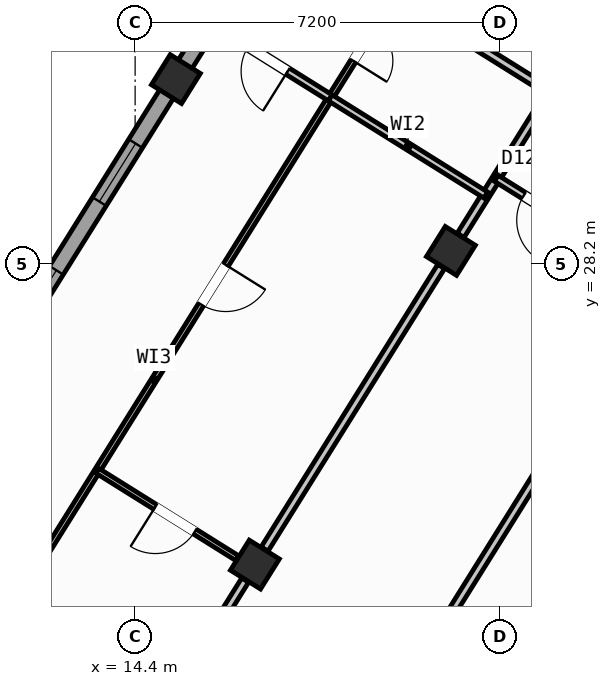
"""IFC4 building model, lengths in metres.
Left out: names, types, materials, properties, quantities, classifications, styles, units other than length and angle.
Written with IfcOpenShell. Run it as: python <this file> out.ifc"""

import sys

from ifc_helpers import new_model, si_unit, direction, frame, frame_2d, origin, origin_2d, place, context, subcontext, project, spatial, rectangle, hollow_rectangle, extrude, source, transform, mapped, element, fill, save


model = new_model("IFC4")
c1 = context("Model", 3, precision=1e-05, world=origin(), true_north=direction((0.0, 1.0)))
c2 = subcontext(c1, "Body", "Model", "MODEL_VIEW")
j1 = project(units=[si_unit("LENGTHUNIT", "METRE"), si_unit("PLANEANGLEUNIT", "RADIAN")], contexts=[c1])
p1 = place(None, origin())
s1 = spatial("IfcSite", under=j1, at=p1, CompositionType="ELEMENT")
p2 = place(p1, origin())
s2 = spatial("IfcBuilding", under=s1, at=p2, CompositionType="ELEMENT")
p3 = place(p2, frame((0.0, 0.0, 284.4)))
s3 = spatial("IfcBuildingStorey", under=s2, at=p3, CompositionType="ELEMENT", Elevation=284.4)
m1 = source(origin(), c2, "Body", "SweptSolid", [
    extrude(hollow_rectangle(XDim=0.7, YDim=0.7, WallThickness=0.028, at=origin_2d()), origin(), (0.0, 0.0, 1.0), 3.6),
])
for number, where, z_axis, x_axis in (
    (1, (20.632, 28.452, 0.0), (0.0, 0.0, 1.0), (-0.848, 0.53, 0.0)),
    (2, (16.764, 22.261, 0.0), (0.0, 0.0, 1.0), (-0.848, 0.53, 0.0)),
    (3, (15.205, 31.844, 0.0), (0.0, 0.0, 1.0), (-0.848, 0.53, 0.0)),
):
    element("IfcColumn", number, at=place(p3, frame(where, z_axis=z_axis, x_axis=x_axis)), inside=s3, PredefinedType="COLUMN", context=c2, shape_type="MappedRepresentation", body=[
        mapped(m1, transform((0.0, 0.0, 0.0), scale=1.0)),
    ])
p4 = place(p3, frame((7.842, 20.061, 0.0), z_axis=(0.0, 0.0, 1.0), x_axis=(0.529915577903, 0.84805039962, 0.0)))
e4 = element("IfcWall", 4, at=p4, inside=s3, PredefinedType="STANDARD", context=c2, shape_type="SweptSolid", body=[
    extrude(rectangle(XDim=21.587, YDim=0.32, at=frame_2d((10.794, 0.0))), origin(), (0.0, 0.0, 1.0), 2.875),
])
p5 = place(p4, frame((2.606, 0.0, 0.9)))
e5 = element("IfcOpeningElement", 5, at=p5, cuts=e4, PredefinedType="OPENING", context=c2, shape_type="SweptSolid", body=[
    extrude(rectangle(XDim=1.65, YDim=1.45, at=frame_2d((0.825, 0.725))), frame((0.0, 0.17, 0.0), z_axis=(0.0, -1.0, 0.0), x_axis=(1.0, 0.0, 0.0)), (0.0, 0.0, 1.0), 0.34),
])
p6 = place(p4, frame((8.094, 0.0, 0.9)))
e6 = element("IfcOpeningElement", 6, at=p6, cuts=e4, PredefinedType="OPENING", context=c2, shape_type="SweptSolid", body=[
    extrude(rectangle(XDim=1.35, YDim=1.45, at=frame_2d((0.675, 0.725))), frame((0.0, 0.17, 0.0), z_axis=(0.0, -1.0, 0.0), x_axis=(1.0, 0.0, 0.0)), (0.0, 0.0, 1.0), 0.34),
])
p7 = place(p4, frame((11.044, 0.0, 0.9)))
e7 = element("IfcOpeningElement", 7, at=p7, cuts=e4, PredefinedType="OPENING", context=c2, shape_type="SweptSolid", body=[
    extrude(rectangle(XDim=1.35, YDim=1.45, at=frame_2d((0.675, 0.725))), frame((0.0, 0.17, 0.0), z_axis=(0.0, -1.0, 0.0), x_axis=(1.0, 0.0, 0.0)), (0.0, 0.0, 1.0), 0.34),
])
p8 = place(p4, frame((15.939, 0.0, 1.0)))
e8 = element("IfcOpeningElement", 8, at=p8, cuts=e4, PredefinedType="OPENING", context=c2, shape_type="SweptSolid", body=[
    extrude(rectangle(XDim=0.9, YDim=1.25, at=frame_2d((0.45, 0.625))), frame((0.0, 0.17, 0.0), z_axis=(0.0, -1.0, 0.0), x_axis=(1.0, 0.0, 0.0)), (0.0, 0.0, 1.0), 0.34),
])
p9 = place(p3, frame((19.566, 38.434, 0.0), z_axis=(0.0, 0.0, 1.0), x_axis=(0.84804567626, -0.529923136858, 0.0)))
e9 = element("IfcWall", 9, at=p9, inside=s3, PredefinedType="STANDARD", context=c2, shape_type="SweptSolid", body=[
    extrude(rectangle(XDim=25.188, YDim=0.32, at=frame_2d((12.594, 0.0))), origin(), (0.0, 0.0, 1.0), 3.35),
])
p10 = place(p9, frame((3.355, 0.0, 0.0)))
e10 = element("IfcOpeningElement", 10, at=p10, cuts=e9, PredefinedType="OPENING", context=c2, shape_type="SweptSolid", body=[
    extrude(rectangle(XDim=1.05, YDim=2.15, at=frame_2d((0.525, 1.075))), frame((0.0, 0.17, 0.0), z_axis=(0.0, -1.0, 0.0), x_axis=(1.0, 0.0, 0.0)), (0.0, 0.0, 1.0), 0.34),
])
p11 = place(p9, frame((0.939, 0.0, 0.9)))
e11 = element("IfcOpeningElement", 11, at=p11, cuts=e9, PredefinedType="OPENING", context=c2, shape_type="SweptSolid", body=[
    extrude(rectangle(XDim=1.65, YDim=1.45, at=frame_2d((0.825, 0.725))), frame((0.0, 0.17, 0.0), z_axis=(0.0, -1.0, 0.0), x_axis=(1.0, 0.0, 0.0)), (0.0, 0.0, 1.0), 0.34),
])
p12 = place(p9, frame((7.499, 0.0, 0.9)))
e12 = element("IfcOpeningElement", 12, at=p12, cuts=e9, PredefinedType="OPENING", context=c2, shape_type="SweptSolid", body=[
    extrude(rectangle(XDim=1.35, YDim=1.45, at=frame_2d((0.675, 0.725))), frame((0.0, 0.17, 0.0), z_axis=(0.0, -1.0, 0.0), x_axis=(1.0, 0.0, 0.0)), (0.0, 0.0, 1.0), 0.34),
])
p13 = place(p9, frame((10.754, 0.0, 1.0)))
e13 = element("IfcOpeningElement", 13, at=p13, cuts=e9, PredefinedType="OPENING", context=c2, shape_type="SweptSolid", body=[
    extrude(rectangle(XDim=0.9, YDim=1.25, at=frame_2d((0.45, 0.625))), frame((0.0, 0.17, 0.0), z_axis=(0.0, -1.0, 0.0), x_axis=(1.0, 0.0, 0.0)), (0.0, 0.0, 1.0), 0.34),
])
p14 = place(p9, frame((15.694, 0.0, 1.0)))
e14 = element("IfcOpeningElement", 14, at=p14, cuts=e9, PredefinedType="OPENING", context=c2, shape_type="SweptSolid", body=[
    extrude(rectangle(XDim=0.9, YDim=1.25, at=frame_2d((0.45, 0.625))), frame((0.0, 0.17, 0.0), z_axis=(0.0, -1.0, 0.0), x_axis=(1.0, 0.0, 0.0)), (0.0, 0.0, 1.0), 0.34),
])
p15 = place(p9, frame((21.394, 0.0, 1.0)))
e15 = element("IfcOpeningElement", 15, at=p15, cuts=e9, PredefinedType="OPENING", context=c2, shape_type="SweptSolid", body=[
    extrude(rectangle(XDim=0.9, YDim=1.25, at=frame_2d((0.45, 0.625))), frame((0.0, 0.17, 0.0), z_axis=(0.0, -1.0, 0.0), x_axis=(1.0, 0.0, 0.0)), (0.0, 0.0, 1.0), 0.34),
])
p16 = place(p3, frame((25.807, 29.582, 0.0), z_axis=(0.0, 0.0, 1.0), x_axis=(-0.529918119251, -0.84804881162, 0.0)))
e16 = element("IfcWall", 16, at=p16, inside=s3, PredefinedType="PARTITIONING", context=c2, shape_type="SweptSolid", body=[
    extrude(rectangle(XDim=17.65, YDim=0.16, at=frame_2d((8.825, 0.0))), origin(), (0.0, 0.0, 1.0), 3.34),
])
p17 = place(p3, frame((26.973, 31.447, 0.0), z_axis=(0.0, 0.0, 1.0), x_axis=(-0.84805406617, 0.529909710094, 0.0)))
e17 = element("IfcWall", 17, at=p17, inside=s3, PredefinedType="PARTITIONING", context=c2, shape_type="SweptSolid", body=[
    extrude(rectangle(XDim=10.33, YDim=0.16, at=frame_2d((5.165, 0.0))), origin(), (0.0, 0.0, 1.0), 3.34),
])
p18 = place(p17, frame((1.459, 0.0, 0.0)))
e18 = element("IfcOpeningElement", 18, at=p18, cuts=e17, PredefinedType="OPENING", context=c2, shape_type="SweptSolid", body=[
    extrude(rectangle(XDim=1.0, YDim=2.1, at=frame_2d((0.5, 1.05))), frame((0.0, 0.09, 0.0), z_axis=(0.0, -1.0, 0.0), x_axis=(1.0, 0.0, 0.0)), (0.0, 0.0, 1.0), 0.18),
])
p19 = place(p17, frame((6.614, 0.0, 0.0)))
e19 = element("IfcOpeningElement", 19, at=p19, cuts=e17, PredefinedType="OPENING", context=c2, shape_type="SweptSolid", body=[
    extrude(rectangle(XDim=1.0, YDim=2.1, at=frame_2d((0.5, 1.05))), frame((0.0, 0.09, 0.0), z_axis=(0.0, -1.0, 0.0), x_axis=(1.0, 0.0, 0.0)), (0.0, 0.0, 1.0), 0.18),
])
p20 = place(p3, frame((25.807, 29.582, 0.0), z_axis=(0.0, 0.0, 1.0), x_axis=(-0.848060702647, 0.529899089097, 0.0)))
e20 = element("IfcWall", 20, at=p20, inside=s3, PredefinedType="PARTITIONING", context=c2, shape_type="SweptSolid", body=[
    extrude(rectangle(XDim=10.33, YDim=0.16, at=frame_2d((5.165, 0.0))), origin(), (0.0, 0.0, 1.0), 3.34),
])
p21 = place(p20, frame((2.22, 0.0, 0.0)))
e21 = element("IfcOpeningElement", 21, at=p21, cuts=e20, PredefinedType="OPENING", context=c2, shape_type="SweptSolid", body=[
    extrude(rectangle(XDim=0.86, YDim=2.05, at=frame_2d((0.43, 1.025))), frame((0.0, 0.09, 0.0), z_axis=(0.0, -1.0, 0.0), x_axis=(1.0, 0.0, 0.0)), (0.0, 0.0, 1.0), 0.18),
])
p22 = place(p20, frame((8.36, 0.0, 0.0)))
e22 = element("IfcOpeningElement", 22, at=p22, cuts=e20, PredefinedType="OPENING", context=c2, shape_type="SweptSolid", body=[
    extrude(rectangle(XDim=1.0, YDim=2.1, at=frame_2d((0.5, 1.05))), frame((0.0, 0.09, 0.0), z_axis=(0.0, -1.0, 0.0), x_axis=(1.0, 0.0, 0.0)), (0.0, 0.0, 1.0), 0.18),
])
p23 = place(p3, frame((22.593, 31.59, 0.0), z_axis=(0.0, 0.0, 1.0), x_axis=(-0.529900320499, -0.848059933221, 0.0)))
e23 = element("IfcWall", 23, at=p23, inside=s3, PredefinedType="PARTITIONING", context=c2, shape_type="SweptSolid", body=[
    extrude(rectangle(XDim=3.338, YDim=0.16, at=frame_2d((1.669, 0.0))), origin(), (0.0, 0.0, 1.0), 2.875),
])
p24 = place(p3, frame((20.44, 28.145, 0.0), z_axis=(0.0, 0.0, 1.0), x_axis=(-0.529938869374, -0.84803584519, 0.0)))
e24 = element("IfcWall", 24, at=p24, inside=s3, PredefinedType="PARTITIONING", context=c2, shape_type="SweptSolid", body=[
    extrude(rectangle(XDim=6.576, YDim=0.16, at=frame_2d((3.288, 0.0))), origin(), (0.0, 0.0, 1.0), 2.875),
])
p25 = place(p3, frame((16.572, 21.954, 0.0), z_axis=(0.0, 0.0, 1.0), x_axis=(-0.529904903214, -0.848057069748, 0.0)))
e25 = element("IfcWall", 25, at=p25, inside=s3, PredefinedType="PARTITIONING", context=c2, shape_type="SweptSolid", body=[
    extrude(rectangle(XDim=5.601, YDim=0.16, at=frame_2d((2.801, 0.0))), origin(), (0.0, 0.0, 1.0), 2.875),
])
p26 = place(p3, frame((24.742, 27.877, 0.0), z_axis=(0.0, 0.0, 1.0), x_axis=(-0.848059820872, 0.529900500304, 0.0)))
e26 = element("IfcWall", 26, at=p26, inside=s3, PredefinedType="PLUMBINGWALL", context=c2, shape_type="SweptSolid", body=[
    extrude(rectangle(XDim=3.79, YDim=0.14, at=frame_2d((1.895, 0.0))), origin(), (0.0, 0.0, 1.0), 3.34),
])
p27 = place(p26, frame((2.23, 0.0, 0.0)))
e27 = element("IfcOpeningElement", 27, at=p27, cuts=e26, PredefinedType="OPENING", context=c2, shape_type="SweptSolid", body=[
    extrude(rectangle(XDim=0.92, YDim=2.08, at=frame_2d((0.46, 1.04))), frame((0.0, 0.08, 0.0), z_axis=(0.0, -1.0, 0.0), x_axis=(1.0, 0.0, 0.0)), (0.0, 0.0, 1.0), 0.16),
])
p28 = place(p3, frame((19.523, 33.508, 0.0), z_axis=(0.0, 0.0, 1.0), x_axis=(-0.529910765222, -0.848053406869, 0.0)))
e28 = element("IfcWall", 28, at=p28, inside=s3, PredefinedType="PARTITIONING", context=c2, shape_type="SweptSolid", body=[
    extrude(rectangle(XDim=17.92, YDim=0.11, at=frame_2d((8.96, 0.0))), origin(), (0.0, 0.0, 1.0), 3.34),
])
p29 = place(p28, frame((0.76, 0.0, 0.0)))
e29 = element("IfcOpeningElement", 29, at=p29, cuts=e28, PredefinedType="OPENING", context=c2, shape_type="SweptSolid", body=[
    extrude(rectangle(XDim=0.78, YDim=2.05, at=frame_2d((0.39, 1.025))), frame((0.0, 0.065, 0.0), z_axis=(0.0, -1.0, 0.0), x_axis=(1.0, 0.0, 0.0)), (0.0, 0.0, 1.0), 0.13),
])
p30 = place(p28, frame((6.289, 0.0, 0.0)))
e30 = element("IfcOpeningElement", 30, at=p30, cuts=e28, PredefinedType="OPENING", context=c2, shape_type="SweptSolid", body=[
    extrude(rectangle(XDim=0.92, YDim=2.08, at=frame_2d((0.46, 1.04))), frame((0.0, 0.065, 0.0), z_axis=(0.0, -1.0, 0.0), x_axis=(1.0, 0.0, 0.0)), (0.0, 0.0, 1.0), 0.13),
])
p31 = place(p3, frame((18.251, 31.473, 0.0), z_axis=(0.0, 0.0, 1.0), x_axis=(-0.848059786386, 0.529900555496, 0.0)))
e31 = element("IfcWall", 31, at=p31, inside=s3, PredefinedType="PLUMBINGWALL", context=c2, shape_type="SweptSolid", body=[
    extrude(rectangle(XDim=2.9, YDim=0.14, at=frame_2d((1.45, 0.0))), origin(), (0.0, 0.0, 1.0), 3.34),
])
p32 = place(p31, frame((0.99, 0.0, 0.0)))
e32 = element("IfcOpeningElement", 32, at=p32, cuts=e31, PredefinedType="OPENING", context=c2, shape_type="SweptSolid", body=[
    extrude(rectangle(XDim=0.92, YDim=2.08, at=frame_2d((0.46, 1.04))), frame((0.0, 0.08, 0.0), z_axis=(0.0, -1.0, 0.0), x_axis=(1.0, 0.0, 0.0)), (0.0, 0.0, 1.0), 0.16),
])
p33 = place(p3, frame((21.321, 29.554, 0.0), z_axis=(0.0, 0.0, 1.0), x_axis=(-0.848021036626, 0.529962566074, 0.0)))
e33 = element("IfcWall", 33, at=p33, inside=s3, PredefinedType="PLUMBINGWALL", context=c2, shape_type="SweptSolid", body=[
    extrude(rectangle(XDim=3.62, YDim=0.14, at=frame_2d((1.81, 0.0))), origin(), (0.0, 0.0, 1.0), 3.34),
])
p34 = place(p3, frame((16.416, 22.388, 0.0), z_axis=(0.0, 0.0, 1.0), x_axis=(-0.84806986598, 0.529884423641, 0.0)))
e34 = element("IfcWall", 34, at=p34, inside=s3, PredefinedType="PARTITIONING", context=c2, shape_type="SweptSolid", body=[
    extrude(rectangle(XDim=3.258, YDim=0.11, at=frame_2d((1.629, 0.0))), origin(), (0.0, 0.0, 1.0), 2.875),
])
p35 = place(p34, frame((0.988, 0.0, 0.0)))
e35 = element("IfcOpeningElement", 35, at=p35, cuts=e34, PredefinedType="OPENING", context=c2, shape_type="SweptSolid", body=[
    extrude(rectangle(XDim=0.92, YDim=2.08, at=frame_2d((0.46, 1.04))), frame((0.0, 0.065, 0.0), z_axis=(0.0, -1.0, 0.0), x_axis=(1.0, 0.0, 0.0)), (0.0, 0.0, 1.0), 0.13),
])
m2 = source(origin(), c2, "Body", "SweptSolid", [
    extrude(rectangle(XDim=1.35, YDim=1.45, at=frame_2d((0.675, 0.725))), frame((0.0, 0.03, 0.0), z_axis=(0.0, -1.0, 0.0), x_axis=(1.0, 0.0, 0.0)), (0.0, 0.0, 1.0), 0.06),
])
p36 = place(p6, origin())
e36 = element("IfcWindow", 36, at=p36, inside=s3, PartitioningType="SINGLE_PANEL", PredefinedType="WINDOW", context=c2, shape_type="MappedRepresentation", body=[
    mapped(m2, transform((0.0, 0.0, 0.0), scale=1.0)),
])
fill(e6, e36)
p37 = place(p7, origin())
e37 = element("IfcWindow", 37, at=p37, inside=s3, PartitioningType="SINGLE_PANEL", PredefinedType="WINDOW", context=c2, shape_type="MappedRepresentation", body=[
    mapped(m2, transform((0.0, 0.0, 0.0), scale=1.0)),
])
fill(e7, e37)
m3 = source(origin(), c2, "Body", "SweptSolid", [
    extrude(rectangle(XDim=0.92, YDim=2.08, at=frame_2d((0.46, 1.04))), frame((0.0, 0.025, 0.0), z_axis=(0.0, -1.0, 0.0), x_axis=(1.0, 0.0, 0.0)), (0.0, 0.0, 1.0), 0.05),
])
p38 = place(p27, origin())
e38 = element("IfcDoor", 38, at=p38, inside=s3, OperationType="SINGLE_SWING_LEFT", PredefinedType="DOOR", context=c2, shape_type="MappedRepresentation", body=[
    mapped(m3, transform((0.0, 0.0, 0.0), scale=1.0)),
])
fill(e27, e38)
p39 = place(p32, origin())
e39 = element("IfcDoor", 39, at=p39, inside=s3, OperationType="SINGLE_SWING_LEFT", PredefinedType="DOOR", context=c2, shape_type="MappedRepresentation", body=[
    mapped(m3, transform((0.0, 0.0, 0.0), scale=1.0)),
])
fill(e32, e39)
m4 = source(origin(), c2, "Body", "SweptSolid", [
    extrude(rectangle(XDim=0.78, YDim=2.05, at=frame_2d((0.39, 1.025))), frame((0.0, 0.025, 0.0), z_axis=(0.0, -1.0, 0.0), x_axis=(1.0, 0.0, 0.0)), (0.0, 0.0, 1.0), 0.05),
])
p40 = place(p29, origin())
e40 = element("IfcDoor", 40, at=p40, inside=s3, OperationType="SINGLE_SWING_RIGHT", PredefinedType="DOOR", context=c2, shape_type="MappedRepresentation", body=[
    mapped(m4, transform((0.0, 0.0, 0.0), scale=1.0)),
])
fill(e29, e40)
p41 = place(p30, origin())
e41 = element("IfcDoor", 41, at=p41, inside=s3, OperationType="SINGLE_SWING_LEFT", PredefinedType="DOOR", context=c2, shape_type="MappedRepresentation", body=[
    mapped(m3, transform((0.0, 0.0, 0.0), scale=1.0)),
])
fill(e30, e41)
p42 = place(p35, origin())
e42 = element("IfcDoor", 42, at=p42, inside=s3, OperationType="SINGLE_SWING_RIGHT", PredefinedType="DOOR", context=c2, shape_type="MappedRepresentation", body=[
    mapped(m3, transform((0.0, 0.0, 0.0), scale=1.0)),
])
fill(e35, e42)
save(model, sys.argv[1])
